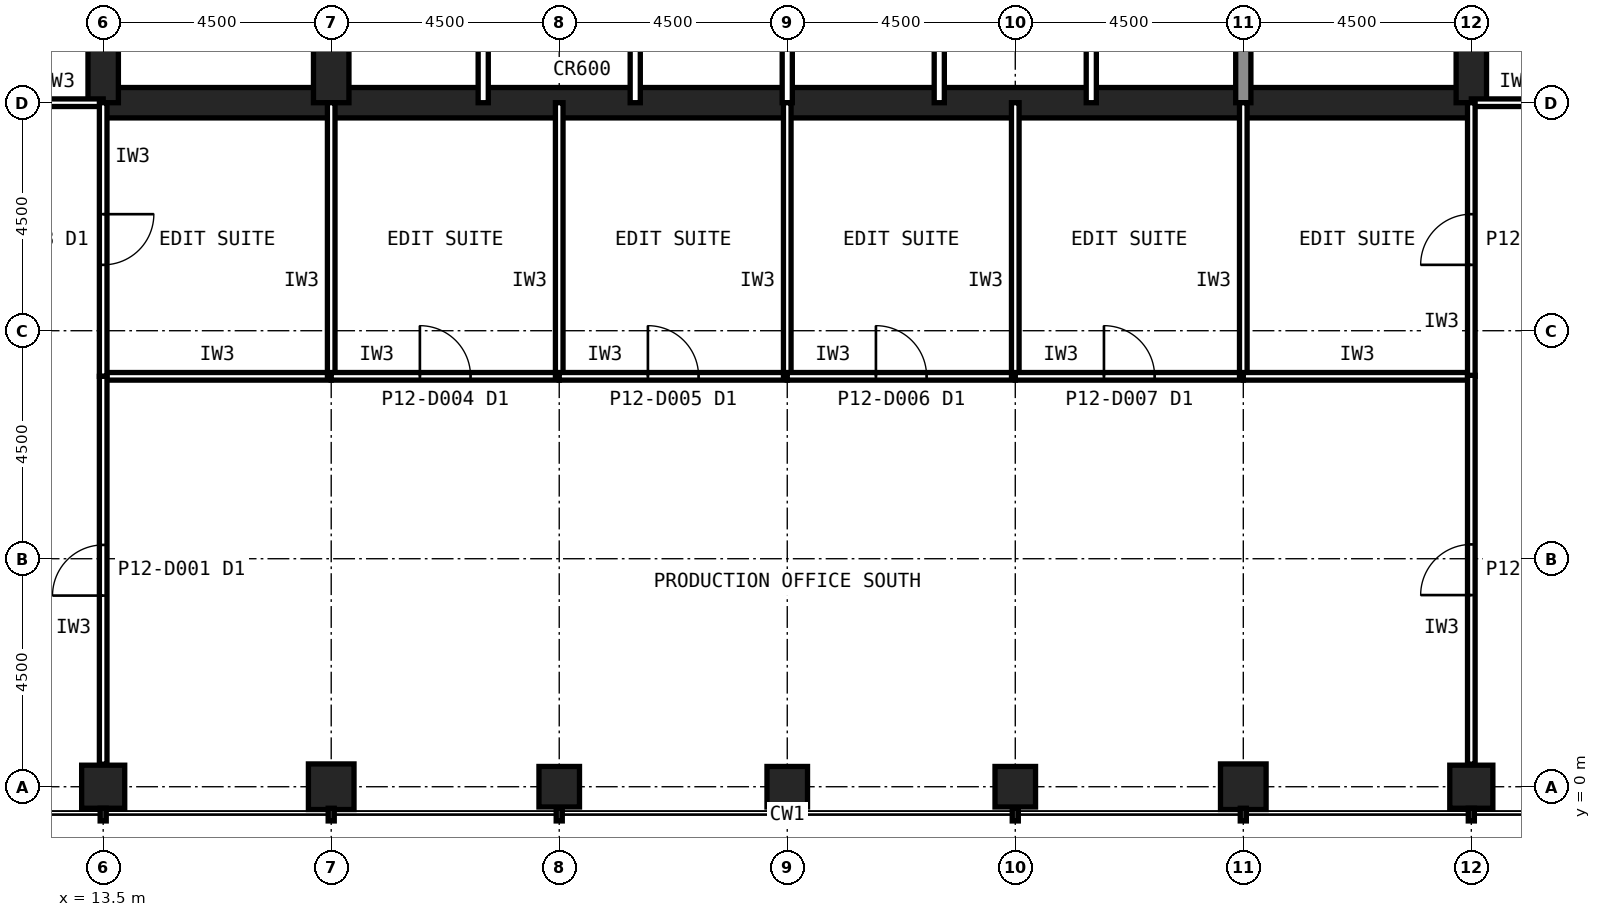
"""IFC4 building model, lengths in metres.
Left out: names, types, materials, properties, quantities, classifications, styles, units other than length and angle.
Written with IfcOpenShell. Run it as: python <this file> out.ifc"""

import sys

from ifc_helpers import new_model, si_unit, direction, frame, frame_2d, origin, origin_2d, place, context, subcontext, project, spatial, rectangle, hollow_rectangle, extrude, element, fill, save


model = new_model("IFC4")
c1 = context("Model", 3, precision=1e-05, world=origin(), true_north=direction((0.0, 1.0)))
c2 = subcontext(c1, "Body", "Model", "MODEL_VIEW")
j1 = project(units=[si_unit("LENGTHUNIT", "METRE"), si_unit("PLANEANGLEUNIT", "RADIAN")], contexts=[c1])
p1 = place(None, origin())
s1 = spatial("IfcSite", under=j1, at=p1, CompositionType="ELEMENT")
p2 = place(p1, origin())
s2 = spatial("IfcBuilding", under=s1, at=p2, CompositionType="ELEMENT")
p3 = place(p2, frame((0.0, 0.0, 54.2)))
s3 = spatial("IfcBuildingStorey", under=s2, at=p3, CompositionType="ELEMENT", Elevation=54.2)
p4 = place(p3, frame((13.5, 0.0, 0.0), z_axis=(0.0, 0.0, 1.0), x_axis=(1.0, 0.0, 0.0)))
e1 = element("IfcColumn", 1, at=p4, inside=s3, PredefinedType="COLUMN", context=c2, shape_type="SweptSolid", body=[
    extrude(hollow_rectangle(XDim=0.85, YDim=0.85, WallThickness=0.05, at=origin_2d()), origin(), (0.0, 0.0, 1.0), 4.2),
])
p5 = place(p3, frame((18.0, 0.0, 0.0), z_axis=(0.0, 0.0, 1.0), x_axis=(1.0, 0.0, 0.0)))
e2 = element("IfcColumn", 2, at=p5, inside=s3, PredefinedType="COLUMN", context=c2, shape_type="SweptSolid", body=[
    extrude(hollow_rectangle(XDim=0.9, YDim=0.9, WallThickness=0.063, at=origin_2d()), origin(), (0.0, 0.0, 1.0), 4.2),
])
for number, where, z_axis, x_axis in (
    (3, (22.5, 0.0, 0.0), (0.0, 0.0, 1.0), (1.0, 0.0, 0.0)),
    (4, (27.0, 0.0, 0.0), (0.0, 0.0, 1.0), (1.0, 0.0, 0.0)),
    (5, (31.5, 0.0, 0.0), (0.0, 0.0, 1.0), (1.0, 0.0, 0.0)),
):
    element("IfcColumn", number, at=place(p3, frame(where, z_axis=z_axis, x_axis=x_axis)), inside=s3, PredefinedType="COLUMN", context=c2, shape_type="SweptSolid", body=[
        extrude(hollow_rectangle(XDim=0.8, YDim=0.8, WallThickness=0.045, at=origin_2d()), origin(), (0.0, 0.0, 1.0), 4.2),
    ])
p6 = place(p3, frame((36.0, 0.0, 0.0), z_axis=(0.0, 0.0, 1.0), x_axis=(1.0, 0.0, 0.0)))
e6 = element("IfcColumn", 6, at=p6, inside=s3, PredefinedType="COLUMN", context=c2, shape_type="SweptSolid", body=[
    extrude(hollow_rectangle(XDim=0.9, YDim=0.9, WallThickness=0.063, at=origin_2d()), origin(), (0.0, 0.0, 1.0), 4.2),
])
p7 = place(p3, frame((40.5, 0.0, 0.0), z_axis=(0.0, 0.0, 1.0), x_axis=(1.0, 0.0, 0.0)))
e7 = element("IfcColumn", 7, at=p7, inside=s3, PredefinedType="COLUMN", context=c2, shape_type="SweptSolid", body=[
    extrude(hollow_rectangle(XDim=0.85, YDim=0.85, WallThickness=0.05, at=origin_2d()), origin(), (0.0, 0.0, 1.0), 4.2),
])
p8 = place(p3, frame((13.5, 13.5, 0.0), z_axis=(0.0, 0.0, 1.0), x_axis=(1.0, 0.0, 0.0)))
e8 = element("IfcWall", 8, at=p8, inside=s3, PredefinedType="SHEAR", context=c2, shape_type="SweptSolid", body=[
    extrude(rectangle(XDim=27.0, YDim=0.6, at=frame_2d((13.5, 0.0))), origin(), (0.0, 0.0, 1.0), 4.2),
])
p9 = place(p3, frame((40.5, 13.5, 0.0), z_axis=(0.0, 0.0, 1.0), x_axis=(0.0, 1.0, 0.0)))
e9 = element("IfcWall", 9, at=p9, inside=s3, PredefinedType="SHEAR", context=c2, shape_type="SweptSolid", body=[
    extrude(rectangle(XDim=27.0, YDim=0.6, at=frame_2d((13.5, 0.0))), origin(), (0.0, 0.0, 1.0), 4.2),
])
p10 = place(p9, frame((5.85, 0.0, 0.0)))
e10 = element("IfcOpeningElement", 10, at=p10, cuts=e9, PredefinedType="OPENING", context=c2, shape_type="SweptSolid", body=[
    extrude(rectangle(XDim=1.8, YDim=2.1, at=frame_2d((0.9, 1.05))), frame((0.0, 0.31, 0.0), z_axis=(0.0, -1.0, 0.0), x_axis=(1.0, 0.0, 0.0)), (0.0, 0.0, 1.0), 0.62),
])
p11 = place(p9, frame((19.65, 0.0, 0.0)))
e11 = element("IfcOpeningElement", 11, at=p11, cuts=e9, PredefinedType="OPENING", context=c2, shape_type="SweptSolid", body=[
    extrude(rectangle(XDim=1.2, YDim=2.1, at=frame_2d((0.6, 1.05))), frame((0.0, 0.31, 0.0), z_axis=(0.0, -1.0, 0.0), x_axis=(1.0, 0.0, 0.0)), (0.0, 0.0, 1.0), 0.62),
])
p12 = place(p3, frame((13.5, 40.5, 0.0), z_axis=(0.0, 0.0, 1.0), x_axis=(0.0, -1.0, 0.0)))
e12 = element("IfcWall", 12, at=p12, inside=s3, PredefinedType="SHEAR", context=c2, shape_type="SweptSolid", body=[
    extrude(rectangle(XDim=27.0, YDim=0.6, at=frame_2d((13.5, 0.0))), origin(), (0.0, 0.0, 1.0), 4.2),
])
p13 = place(p12, frame((19.65, 0.0, 0.0)))
e13 = element("IfcOpeningElement", 13, at=p13, cuts=e12, PredefinedType="OPENING", context=c2, shape_type="SweptSolid", body=[
    extrude(rectangle(XDim=1.2, YDim=2.1, at=frame_2d((0.6, 1.05))), frame((0.0, 0.31, 0.0), z_axis=(0.0, -1.0, 0.0), x_axis=(1.0, 0.0, 0.0)), (0.0, 0.0, 1.0), 0.62),
])
p14 = place(p12, frame((5.85, 0.0, 0.0)))
e14 = element("IfcOpeningElement", 14, at=p14, cuts=e12, PredefinedType="OPENING", context=c2, shape_type="SweptSolid", body=[
    extrude(rectangle(XDim=1.8, YDim=2.1, at=frame_2d((0.9, 1.05))), frame((0.0, 0.31, 0.0), z_axis=(0.0, -1.0, 0.0), x_axis=(1.0, 0.0, 0.0)), (0.0, 0.0, 1.0), 0.62),
])
p15 = place(p3, frame((18.0, 13.5, 0.0), z_axis=(0.0, 0.0, 1.0), x_axis=(0.0, 1.0, 0.0)))
e15 = element("IfcWall", 15, at=p15, inside=s3, PredefinedType="SHEAR", context=c2, shape_type="SweptSolid", body=[
    extrude(rectangle(XDim=18.0, YDim=0.7, at=frame_2d((9.0, 0.0))), origin(), (0.0, 0.0, 1.0), 4.2),
])
p16 = place(p3, frame((36.0, 13.5, 0.0), z_axis=(0.0, 0.0, 1.0), x_axis=(0.0, 1.0, 0.0)))
e16 = element("IfcWall", 16, at=p16, inside=s3, PredefinedType="SOLIDWALL", context=c2, shape_type="SweptSolid", body=[
    extrude(rectangle(XDim=4.5, YDim=0.3, at=frame_2d((2.25, 0.0))), origin(), (0.0, 0.0, 1.0), 4.04),
])
for number, where, z_axis, x_axis in (
    (17, (21.0, 13.5, 0.0), (0.0, 0.0, 1.0), (0.0, 1.0, 0.0)),
    (18, (24.0, 13.5, 0.0), (0.0, 0.0, 1.0), (0.0, 1.0, 0.0)),
    (19, (27.0, 13.5, 0.0), (0.0, 0.0, 1.0), (0.0, 1.0, 0.0)),
    (20, (30.0, 13.5, 0.0), (0.0, 0.0, 1.0), (0.0, 1.0, 0.0)),
    (21, (33.0, 13.5, 0.0), (0.0, 0.0, 1.0), (0.0, 1.0, 0.0)),
):
    element("IfcWall", number, at=place(p3, frame(where, z_axis=z_axis, x_axis=x_axis)), inside=s3, PredefinedType="PARTITIONING", context=c2, shape_type="SweptSolid", body=[
        extrude(rectangle(XDim=4.5, YDim=0.2, at=frame_2d((2.25, 0.0))), origin(), (0.0, 0.0, 1.0), 4.04),
    ])
for number, where, z_axis, x_axis in (
    (22, (11.7, 13.5, 0.0), (0.0, 0.0, 1.0), (1.0, 0.0, 0.0)),
    (23, (40.5, 13.5, 0.0), (0.0, 0.0, 1.0), (1.0, 0.0, 0.0)),
):
    element("IfcWall", number, at=place(p3, frame(where, z_axis=z_axis, x_axis=x_axis)), inside=s3, PredefinedType="PARTITIONING", context=c2, shape_type="SweptSolid", body=[
        extrude(rectangle(XDim=1.8, YDim=0.15, at=frame_2d((0.9, 0.0))), origin(), (0.0, 0.0, 1.0), 3.189),
    ])
p17 = place(p3, frame((13.5, 8.1, 0.0), z_axis=(0.0, 0.0, 1.0), x_axis=(1.0, 0.0, 0.0)))
e24 = element("IfcWall", 24, at=p17, inside=s3, PredefinedType="PARTITIONING", context=c2, shape_type="SweptSolid", body=[
    extrude(rectangle(XDim=4.5, YDim=0.15, at=frame_2d((2.25, 0.0))), origin(), (0.0, 0.0, 1.0), 4.04),
])
p18 = place(p3, frame((18.0, 8.1, 0.0), z_axis=(0.0, 0.0, 1.0), x_axis=(0.0, 1.0, 0.0)))
e25 = element("IfcWall", 25, at=p18, inside=s3, PredefinedType="PARTITIONING", context=c2, shape_type="SweptSolid", body=[
    extrude(rectangle(XDim=5.4, YDim=0.15, at=frame_2d((2.7, 0.0))), origin(), (0.0, 0.0, 1.0), 3.189),
])
p19 = place(p3, frame((13.5, 13.5, 0.0), z_axis=(0.0, 0.0, 1.0), x_axis=(0.0, -1.0, 0.0)))
e26 = element("IfcWall", 26, at=p19, inside=s3, PredefinedType="PARTITIONING", context=c2, shape_type="SweptSolid", body=[
    extrude(rectangle(XDim=5.4, YDim=0.15, at=frame_2d((2.7, 0.0))), origin(), (0.0, 0.0, 1.0), 3.189),
])
p20 = place(p19, frame((2.2, 0.0, 0.0)))
e27 = element("IfcOpeningElement", 27, at=p20, cuts=e26, PredefinedType="OPENING", context=c2, shape_type="SweptSolid", body=[
    extrude(rectangle(XDim=1.0, YDim=2.1, at=frame_2d((0.5, 1.05))), frame((0.0, 0.085, 0.0), z_axis=(0.0, -1.0, 0.0), x_axis=(1.0, 0.0, 0.0)), (0.0, 0.0, 1.0), 0.17),
])
p21 = place(p3, frame((18.0, 8.1, 0.0), z_axis=(0.0, 0.0, 1.0), x_axis=(1.0, 0.0, 0.0)))
e28 = element("IfcWall", 28, at=p21, inside=s3, PredefinedType="PARTITIONING", context=c2, shape_type="SweptSolid", body=[
    extrude(rectangle(XDim=4.5, YDim=0.15, at=frame_2d((2.25, 0.0))), origin(), (0.0, 0.0, 1.0), 4.04),
])
p22 = place(p21, frame((1.75, 0.0, 0.0)))
e29 = element("IfcOpeningElement", 29, at=p22, cuts=e28, PredefinedType="OPENING", context=c2, shape_type="SweptSolid", body=[
    extrude(rectangle(XDim=1.0, YDim=2.1, at=frame_2d((0.5, 1.05))), frame((0.0, 0.085, 0.0), z_axis=(0.0, -1.0, 0.0), x_axis=(1.0, 0.0, 0.0)), (0.0, 0.0, 1.0), 0.17),
])
p23 = place(p3, frame((22.5, 8.1, 0.0), z_axis=(0.0, 0.0, 1.0), x_axis=(0.0, 1.0, 0.0)))
e30 = element("IfcWall", 30, at=p23, inside=s3, PredefinedType="PARTITIONING", context=c2, shape_type="SweptSolid", body=[
    extrude(rectangle(XDim=5.4, YDim=0.15, at=frame_2d((2.7, 0.0))), origin(), (0.0, 0.0, 1.0), 3.189),
])
p24 = place(p3, frame((22.5, 8.1, 0.0), z_axis=(0.0, 0.0, 1.0), x_axis=(1.0, 0.0, 0.0)))
e31 = element("IfcWall", 31, at=p24, inside=s3, PredefinedType="PARTITIONING", context=c2, shape_type="SweptSolid", body=[
    extrude(rectangle(XDim=4.5, YDim=0.15, at=frame_2d((2.25, 0.0))), origin(), (0.0, 0.0, 1.0), 4.04),
])
p25 = place(p24, frame((1.75, 0.0, 0.0)))
e32 = element("IfcOpeningElement", 32, at=p25, cuts=e31, PredefinedType="OPENING", context=c2, shape_type="SweptSolid", body=[
    extrude(rectangle(XDim=1.0, YDim=2.1, at=frame_2d((0.5, 1.05))), frame((0.0, 0.085, 0.0), z_axis=(0.0, -1.0, 0.0), x_axis=(1.0, 0.0, 0.0)), (0.0, 0.0, 1.0), 0.17),
])
p26 = place(p3, frame((27.0, 8.1, 0.0), z_axis=(0.0, 0.0, 1.0), x_axis=(0.0, 1.0, 0.0)))
e33 = element("IfcWall", 33, at=p26, inside=s3, PredefinedType="PARTITIONING", context=c2, shape_type="SweptSolid", body=[
    extrude(rectangle(XDim=5.4, YDim=0.15, at=frame_2d((2.7, 0.0))), origin(), (0.0, 0.0, 1.0), 3.189),
])
p27 = place(p3, frame((27.0, 8.1, 0.0), z_axis=(0.0, 0.0, 1.0), x_axis=(1.0, 0.0, 0.0)))
e34 = element("IfcWall", 34, at=p27, inside=s3, PredefinedType="PARTITIONING", context=c2, shape_type="SweptSolid", body=[
    extrude(rectangle(XDim=4.5, YDim=0.15, at=frame_2d((2.25, 0.0))), origin(), (0.0, 0.0, 1.0), 4.04),
])
p28 = place(p27, frame((1.75, 0.0, 0.0)))
e35 = element("IfcOpeningElement", 35, at=p28, cuts=e34, PredefinedType="OPENING", context=c2, shape_type="SweptSolid", body=[
    extrude(rectangle(XDim=1.0, YDim=2.1, at=frame_2d((0.5, 1.05))), frame((0.0, 0.085, 0.0), z_axis=(0.0, -1.0, 0.0), x_axis=(1.0, 0.0, 0.0)), (0.0, 0.0, 1.0), 0.17),
])
p29 = place(p3, frame((31.5, 8.1, 0.0), z_axis=(0.0, 0.0, 1.0), x_axis=(0.0, 1.0, 0.0)))
e36 = element("IfcWall", 36, at=p29, inside=s3, PredefinedType="PARTITIONING", context=c2, shape_type="SweptSolid", body=[
    extrude(rectangle(XDim=5.4, YDim=0.15, at=frame_2d((2.7, 0.0))), origin(), (0.0, 0.0, 1.0), 3.189),
])
p30 = place(p3, frame((31.5, 8.1, 0.0), z_axis=(0.0, 0.0, 1.0), x_axis=(1.0, 0.0, 0.0)))
e37 = element("IfcWall", 37, at=p30, inside=s3, PredefinedType="PARTITIONING", context=c2, shape_type="SweptSolid", body=[
    extrude(rectangle(XDim=4.5, YDim=0.15, at=frame_2d((2.25, 0.0))), origin(), (0.0, 0.0, 1.0), 4.04),
])
p31 = place(p30, frame((1.75, 0.0, 0.0)))
e38 = element("IfcOpeningElement", 38, at=p31, cuts=e37, PredefinedType="OPENING", context=c2, shape_type="SweptSolid", body=[
    extrude(rectangle(XDim=1.0, YDim=2.1, at=frame_2d((0.5, 1.05))), frame((0.0, 0.085, 0.0), z_axis=(0.0, -1.0, 0.0), x_axis=(1.0, 0.0, 0.0)), (0.0, 0.0, 1.0), 0.17),
])
p32 = place(p3, frame((36.0, 8.1, 0.0), z_axis=(0.0, 0.0, 1.0), x_axis=(0.0, 1.0, 0.0)))
e39 = element("IfcWall", 39, at=p32, inside=s3, PredefinedType="PARTITIONING", context=c2, shape_type="SweptSolid", body=[
    extrude(rectangle(XDim=5.4, YDim=0.15, at=frame_2d((2.7, 0.0))), origin(), (0.0, 0.0, 1.0), 3.189),
])
p33 = place(p3, frame((36.0, 8.1, 0.0), z_axis=(0.0, 0.0, 1.0), x_axis=(1.0, 0.0, 0.0)))
e40 = element("IfcWall", 40, at=p33, inside=s3, PredefinedType="PARTITIONING", context=c2, shape_type="SweptSolid", body=[
    extrude(rectangle(XDim=4.5, YDim=0.15, at=frame_2d((2.25, 0.0))), origin(), (0.0, 0.0, 1.0), 4.04),
])
p34 = place(p3, frame((40.5, 8.1, 0.0), z_axis=(0.0, 0.0, 1.0), x_axis=(0.0, 1.0, 0.0)))
e41 = element("IfcWall", 41, at=p34, inside=s3, PredefinedType="PARTITIONING", context=c2, shape_type="SweptSolid", body=[
    extrude(rectangle(XDim=5.4, YDim=0.15, at=frame_2d((2.7, 0.0))), origin(), (0.0, 0.0, 1.0), 3.189),
])
p35 = place(p34, frame((2.2, 0.0, 0.0)))
e42 = element("IfcOpeningElement", 42, at=p35, cuts=e41, PredefinedType="OPENING", context=c2, shape_type="SweptSolid", body=[
    extrude(rectangle(XDim=1.0, YDim=2.1, at=frame_2d((0.5, 1.05))), frame((0.0, 0.085, 0.0), z_axis=(0.0, -1.0, 0.0), x_axis=(1.0, 0.0, 0.0)), (0.0, 0.0, 1.0), 0.17),
])
p36 = place(p3, frame((40.5, 0.445, 0.0), z_axis=(0.0, 0.0, 1.0), x_axis=(0.0, 1.0, 0.0)))
e43 = element("IfcWall", 43, at=p36, inside=s3, PredefinedType="PARTITIONING", context=c2, shape_type="SweptSolid", body=[
    extrude(rectangle(XDim=7.675, YDim=0.15, at=frame_2d((3.837, 0.0))), origin(), (0.0, 0.0, 1.0), 3.189),
])
p37 = place(p36, frame((3.337, 0.0, 0.0)))
e44 = element("IfcOpeningElement", 44, at=p37, cuts=e43, PredefinedType="OPENING", context=c2, shape_type="SweptSolid", body=[
    extrude(rectangle(XDim=1.0, YDim=2.1, at=frame_2d((0.5, 1.05))), frame((0.0, 0.085, 0.0), z_axis=(0.0, -1.0, 0.0), x_axis=(1.0, 0.0, 0.0)), (0.0, 0.0, 1.0), 0.17),
])
p38 = place(p3, frame((13.5, 0.445, 0.0), z_axis=(0.0, 0.0, 1.0), x_axis=(0.0, 1.0, 0.0)))
e45 = element("IfcWall", 45, at=p38, inside=s3, PredefinedType="PARTITIONING", context=c2, shape_type="SweptSolid", body=[
    extrude(rectangle(XDim=7.655, YDim=0.15, at=frame_2d((3.828, 0.0))), origin(), (0.0, 0.0, 1.0), 3.189),
])
p39 = place(p38, frame((3.327, 0.0, 0.0)))
e46 = element("IfcOpeningElement", 46, at=p39, cuts=e45, PredefinedType="OPENING", context=c2, shape_type="SweptSolid", body=[
    extrude(rectangle(XDim=1.0, YDim=2.1, at=frame_2d((0.5, 1.05))), frame((0.0, 0.085, 0.0), z_axis=(0.0, -1.0, 0.0), x_axis=(1.0, 0.0, 0.0)), (0.0, 0.0, 1.0), 0.17),
])
p40 = place(p20, origin())
e47 = element("IfcDoor", 47, at=p40, inside=s3, OperationType="SINGLE_SWING_LEFT", PredefinedType="DOOR", context=c2, shape_type="SweptSolid", body=[
    extrude(rectangle(XDim=1.0, YDim=2.1, at=frame_2d((0.5, 1.05))), frame((0.0, 0.025, 0.0), z_axis=(0.0, -1.0, 0.0), x_axis=(1.0, 0.0, 0.0)), (0.0, 0.0, 1.0), 0.05),
])
fill(e27, e47)
p41 = place(p22, origin())
e48 = element("IfcDoor", 48, at=p41, inside=s3, OperationType="SINGLE_SWING_LEFT", PredefinedType="DOOR", context=c2, shape_type="SweptSolid", body=[
    extrude(rectangle(XDim=1.0, YDim=2.1, at=frame_2d((0.5, 1.05))), frame((0.0, 0.025, 0.0), z_axis=(0.0, -1.0, 0.0), x_axis=(1.0, 0.0, 0.0)), (0.0, 0.0, 1.0), 0.05),
])
fill(e29, e48)
p42 = place(p25, origin())
e49 = element("IfcDoor", 49, at=p42, inside=s3, OperationType="SINGLE_SWING_LEFT", PredefinedType="DOOR", context=c2, shape_type="SweptSolid", body=[
    extrude(rectangle(XDim=1.0, YDim=2.1, at=frame_2d((0.5, 1.05))), frame((0.0, 0.025, 0.0), z_axis=(0.0, -1.0, 0.0), x_axis=(1.0, 0.0, 0.0)), (0.0, 0.0, 1.0), 0.05),
])
fill(e32, e49)
p43 = place(p28, origin())
e50 = element("IfcDoor", 50, at=p43, inside=s3, OperationType="SINGLE_SWING_LEFT", PredefinedType="DOOR", context=c2, shape_type="SweptSolid", body=[
    extrude(rectangle(XDim=1.0, YDim=2.1, at=frame_2d((0.5, 1.05))), frame((0.0, 0.025, 0.0), z_axis=(0.0, -1.0, 0.0), x_axis=(1.0, 0.0, 0.0)), (0.0, 0.0, 1.0), 0.05),
])
fill(e35, e50)
p44 = place(p31, origin())
e51 = element("IfcDoor", 51, at=p44, inside=s3, OperationType="SINGLE_SWING_LEFT", PredefinedType="DOOR", context=c2, shape_type="SweptSolid", body=[
    extrude(rectangle(XDim=1.0, YDim=2.1, at=frame_2d((0.5, 1.05))), frame((0.0, 0.025, 0.0), z_axis=(0.0, -1.0, 0.0), x_axis=(1.0, 0.0, 0.0)), (0.0, 0.0, 1.0), 0.05),
])
fill(e38, e51)
p45 = place(p35, origin())
e52 = element("IfcDoor", 52, at=p45, inside=s3, OperationType="SINGLE_SWING_LEFT", PredefinedType="DOOR", context=c2, shape_type="SweptSolid", body=[
    extrude(rectangle(XDim=1.0, YDim=2.1, at=frame_2d((0.5, 1.05))), frame((0.0, 0.025, 0.0), z_axis=(0.0, -1.0, 0.0), x_axis=(1.0, 0.0, 0.0)), (0.0, 0.0, 1.0), 0.05),
])
fill(e42, e52)
p46 = place(p37, origin())
e53 = element("IfcDoor", 53, at=p46, inside=s3, OperationType="SINGLE_SWING_LEFT", PredefinedType="DOOR", context=c2, shape_type="SweptSolid", body=[
    extrude(rectangle(XDim=1.0, YDim=2.1, at=frame_2d((0.5, 1.05))), frame((0.0, 0.025, 0.0), z_axis=(0.0, -1.0, 0.0), x_axis=(1.0, 0.0, 0.0)), (0.0, 0.0, 1.0), 0.05),
])
fill(e44, e53)
p47 = place(p39, origin())
e54 = element("IfcDoor", 54, at=p47, inside=s3, OperationType="SINGLE_SWING_LEFT", PredefinedType="DOOR", context=c2, shape_type="SweptSolid", body=[
    extrude(rectangle(XDim=1.0, YDim=2.1, at=frame_2d((0.5, 1.05))), frame((0.0, 0.025, 0.0), z_axis=(0.0, -1.0, 0.0), x_axis=(1.0, 0.0, 0.0)), (0.0, 0.0, 1.0), 0.05),
])
fill(e46, e54)
save(model, sys.argv[1])
